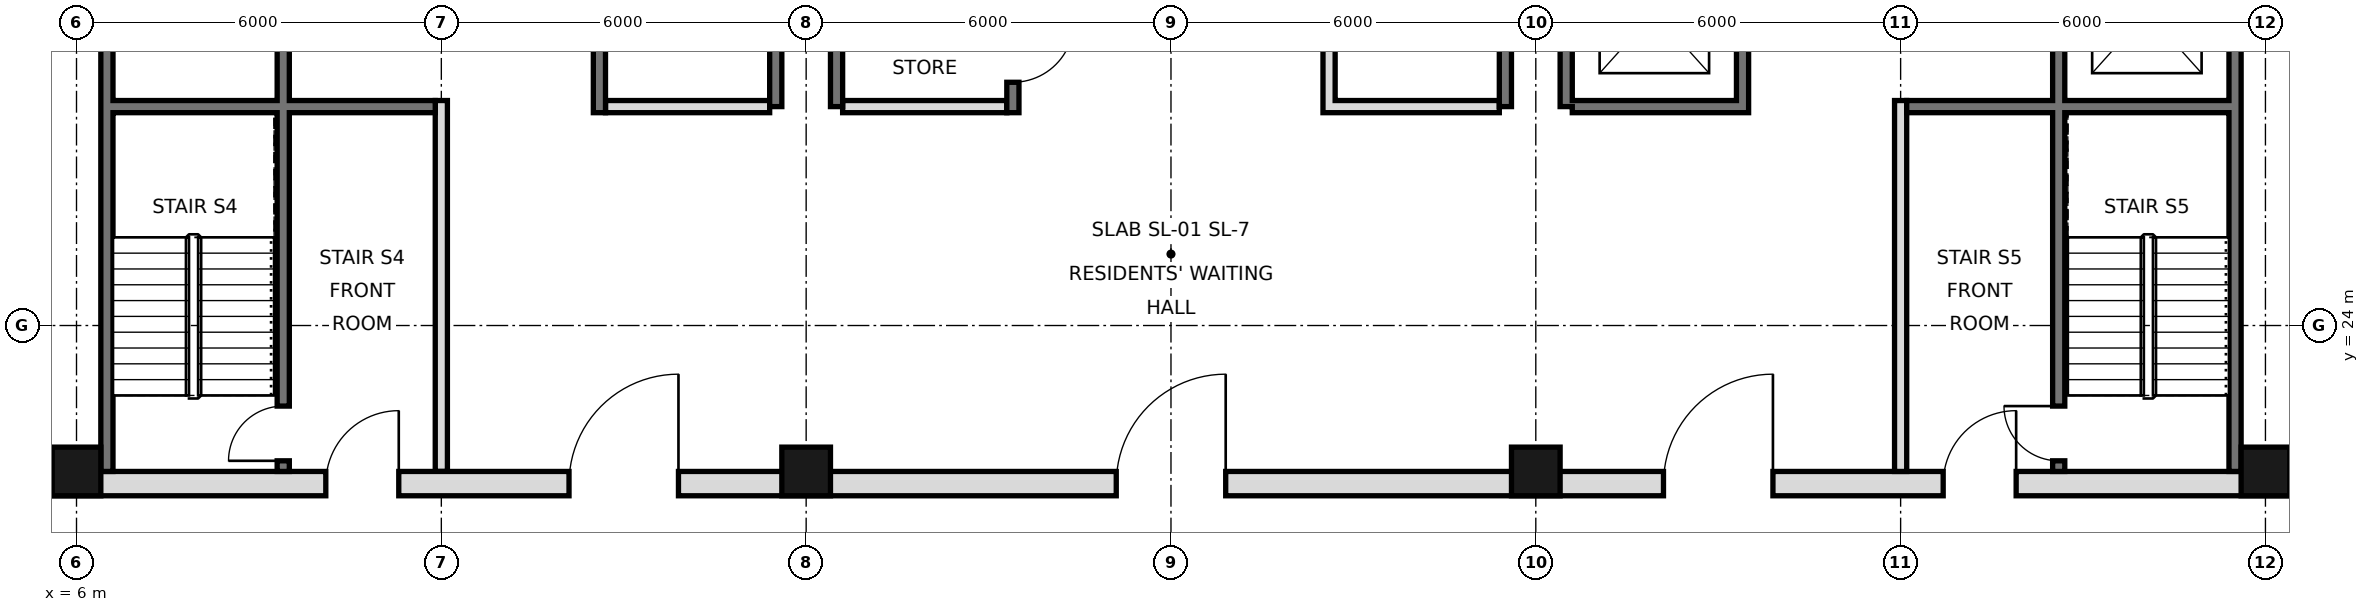
"""IFC4 building model, lengths in metres.
Left out: names, types, materials, properties, quantities, classifications, styles, units other than length and angle.
Written with IfcOpenShell. Run it as: python <this file> out.ifc"""

import sys

from ifc_helpers import new_model, si_unit, direction, frame, frame_2d, origin, origin_2d, place, context, subcontext, project, spatial, rectangle, hollow_rectangle, extrude, element, fill, save


model = new_model("IFC4")
c1 = context("Model", 3, precision=1e-05, world=origin(), true_north=direction((0.0, 1.0)))
c2 = subcontext(c1, "Body", "Model", "MODEL_VIEW")
j1 = project(units=[si_unit("LENGTHUNIT", "METRE"), si_unit("PLANEANGLEUNIT", "RADIAN")], contexts=[c1])
p1 = place(None, origin())
s1 = spatial("IfcSite", under=j1, at=p1, CompositionType="ELEMENT")
p2 = place(p1, origin())
s2 = spatial("IfcBuilding", under=s1, at=p2, CompositionType="ELEMENT")
p3 = place(p2, frame((0.0, 0.0, 301.6)))
s3 = spatial("IfcBuildingStorey", under=s2, at=p3, CompositionType="ELEMENT", Elevation=301.6)
for number, where, z_axis, x_axis in (
    (1, (6.0, 21.6, 0.0), (0.0, 0.0, 1.0), (1.0, 0.0, 0.0)),
    (2, (18.0, 21.6, 0.0), (0.0, 0.0, 1.0), (1.0, 0.0, 0.0)),
    (3, (30.0, 21.6, 0.0), (0.0, 0.0, 1.0), (1.0, 0.0, 0.0)),
    (4, (42.0, 21.6, 0.0), (0.0, 0.0, 1.0), (1.0, 0.0, 0.0)),
):
    element("IfcColumn", number, at=place(p3, frame(where, z_axis=z_axis, x_axis=x_axis)), inside=s3, PredefinedType="COLUMN", context=c2, shape_type="SweptSolid", body=[
        extrude(hollow_rectangle(XDim=0.8, YDim=0.8, WallThickness=0.025, at=origin_2d()), origin(), (0.0, 0.0, 1.0), 3.6),
    ])
for number, where, z_axis, x_axis in (
    (5, (6.5, 21.6, 0.0), (0.0, 0.0, 1.0), (0.0, 1.0, 0.0)),
    (6, (41.5, 21.6, 0.0), (0.0, 0.0, 1.0), (0.0, 1.0, 0.0)),
):
    element("IfcWall", number, at=place(p3, frame(where, z_axis=z_axis, x_axis=x_axis)), inside=s3, PredefinedType="SOLIDWALL", context=c2, shape_type="SweptSolid", body=[
        extrude(rectangle(XDim=23.5, YDim=0.2, at=frame_2d((11.75, 0.0))), origin(), (0.0, 0.0, 1.0), 3.42),
    ])
for number, where, z_axis, x_axis in (
    (7, (17.5, 27.6, 0.0), (0.0, 0.0, 1.0), (0.0, 1.0, 0.0)),
    (8, (18.5, 27.6, 0.0), (0.0, 0.0, 1.0), (0.0, 1.0, 0.0)),
    (9, (29.5, 27.6, 0.0), (0.0, 0.0, 1.0), (0.0, 1.0, 0.0)),
    (10, (30.5, 27.6, 0.0), (0.0, 0.0, 1.0), (0.0, 1.0, 0.0)),
):
    element("IfcWall", number, at=place(p3, frame(where, z_axis=z_axis, x_axis=x_axis)), inside=s3, PredefinedType="SOLIDWALL", context=c2, shape_type="SweptSolid", body=[
        extrude(rectangle(XDim=17.5, YDim=0.2, at=frame_2d((8.75, 0.0))), origin(), (0.0, 0.0, 1.0), 3.42),
    ])
p4 = place(p3, frame((5.6, 21.4, 0.0), z_axis=(0.0, 0.0, 1.0), x_axis=(1.0, 0.0, 0.0)))
e11 = element("IfcWall", 11, at=p4, inside=s3, PredefinedType="SOLIDWALL", context=c2, shape_type="SweptSolid", body=[
    extrude(rectangle(XDim=36.8, YDim=0.4, at=frame_2d((18.4, 0.0))), origin(), (0.0, 0.0, 1.0), 3.42),
])
p5 = place(p4, frame((8.5, 0.0, 0.0)))
e12 = element("IfcOpeningElement", 12, at=p5, cuts=e11, PredefinedType="OPENING", context=c2, shape_type="SweptSolid", body=[
    extrude(rectangle(XDim=1.8, YDim=2.1, at=frame_2d((0.9, 1.05))), frame((0.0, 0.21, 0.0), z_axis=(0.0, -1.0, 0.0), x_axis=(1.0, 0.0, 0.0)), (0.0, 0.0, 1.0), 0.42),
])
p6 = place(p4, frame((17.5, 0.0, 0.0)))
e13 = element("IfcOpeningElement", 13, at=p6, cuts=e11, PredefinedType="OPENING", context=c2, shape_type="SweptSolid", body=[
    extrude(rectangle(XDim=1.8, YDim=2.1, at=frame_2d((0.9, 1.05))), frame((0.0, 0.21, 0.0), z_axis=(0.0, -1.0, 0.0), x_axis=(1.0, 0.0, 0.0)), (0.0, 0.0, 1.0), 0.42),
])
p7 = place(p4, frame((26.5, 0.0, 0.0)))
e14 = element("IfcOpeningElement", 14, at=p7, cuts=e11, PredefinedType="OPENING", context=c2, shape_type="SweptSolid", body=[
    extrude(rectangle(XDim=1.8, YDim=2.1, at=frame_2d((0.9, 1.05))), frame((0.0, 0.21, 0.0), z_axis=(0.0, -1.0, 0.0), x_axis=(1.0, 0.0, 0.0)), (0.0, 0.0, 1.0), 0.42),
])
p8 = place(p4, frame((4.5, 0.0, 0.0)))
e15 = element("IfcOpeningElement", 15, at=p8, cuts=e11, PredefinedType="OPENING", context=c2, shape_type="SweptSolid", body=[
    extrude(rectangle(XDim=1.2, YDim=2.1, at=frame_2d((0.6, 1.05))), frame((0.0, 0.21, 0.0), z_axis=(0.0, -1.0, 0.0), x_axis=(1.0, 0.0, 0.0)), (0.0, 0.0, 1.0), 0.42),
])
p9 = place(p4, frame((31.1, 0.0, 0.0)))
e16 = element("IfcOpeningElement", 16, at=p9, cuts=e11, PredefinedType="OPENING", context=c2, shape_type="SweptSolid", body=[
    extrude(rectangle(XDim=1.2, YDim=2.1, at=frame_2d((0.6, 1.05))), frame((0.0, 0.21, 0.0), z_axis=(0.0, -1.0, 0.0), x_axis=(1.0, 0.0, 0.0)), (0.0, 0.0, 1.0), 0.42),
])
p10 = place(p3, frame((12.0, 21.6, 0.0), z_axis=(0.0, 0.0, 1.0), x_axis=(0.0, 1.0, 0.0)))
e17 = element("IfcWall", 17, at=p10, inside=s3, PredefinedType="PARTITIONING", context=c2, shape_type="SweptSolid", body=[
    extrude(rectangle(XDim=6.1, YDim=0.2, at=frame_2d((3.05, 0.0))), origin(), (0.0, 0.0, 1.0), 3.42),
])
p11 = place(p3, frame((14.6, 27.5, 0.0), z_axis=(0.0, 0.0, 1.0), x_axis=(0.0, 1.0, 0.0)))
e18 = element("IfcWall", 18, at=p11, inside=s3, PredefinedType="SOLIDWALL", context=c2, shape_type="SweptSolid", body=[
    extrude(rectangle(XDim=17.5, YDim=0.2, at=frame_2d((8.75, 0.0))), origin(), (0.0, 0.0, 1.0), 3.42),
])
p12 = place(p11, frame((15.4, 0.0, 0.0)))
e19 = element("IfcOpeningElement", 19, at=p12, cuts=e18, PredefinedType="OPENING", context=c2, shape_type="SweptSolid", body=[
    extrude(rectangle(XDim=1.1, YDim=2.1, at=frame_2d((0.55, 1.05))), frame((0.0, 0.11, 0.0), z_axis=(0.0, -1.0, 0.0), x_axis=(1.0, 0.0, 0.0)), (0.0, 0.0, 1.0), 0.22),
])
p13 = place(p11, frame((2.7, 0.0, 0.0)))
e20 = element("IfcOpeningElement", 20, at=p13, cuts=e18, PredefinedType="OPENING", context=c2, shape_type="SweptSolid", body=[
    extrude(rectangle(XDim=1.0, YDim=2.1, at=frame_2d((0.5, 1.05))), frame((0.0, 0.11, 0.0), z_axis=(0.0, -1.0, 0.0), x_axis=(1.0, 0.0, 0.0)), (0.0, 0.0, 1.0), 0.22),
])
p14 = place(p11, frame((9.9, 0.0, 0.0)))
e21 = element("IfcOpeningElement", 21, at=p14, cuts=e18, PredefinedType="OPENING", context=c2, shape_type="SweptSolid", body=[
    extrude(rectangle(XDim=0.9, YDim=2.1, at=frame_2d((0.45, 1.05))), frame((0.0, 0.11, 0.0), z_axis=(0.0, -1.0, 0.0), x_axis=(1.0, 0.0, 0.0)), (0.0, 0.0, 1.0), 0.22),
])
p15 = place(p3, frame((21.4, 27.5, 0.0), z_axis=(0.0, 0.0, 1.0), x_axis=(0.0, 1.0, 0.0)))
e22 = element("IfcWall", 22, at=p15, inside=s3, PredefinedType="SOLIDWALL", context=c2, shape_type="SweptSolid", body=[
    extrude(rectangle(XDim=17.5, YDim=0.2, at=frame_2d((8.75, 0.0))), origin(), (0.0, 0.0, 1.0), 3.42),
])
p16 = place(p15, frame((0.5, 0.0, 0.0)))
e23 = element("IfcOpeningElement", 23, at=p16, cuts=e22, PredefinedType="OPENING", context=c2, shape_type="SweptSolid", body=[
    extrude(rectangle(XDim=1.0, YDim=2.1, at=frame_2d((0.5, 1.05))), frame((0.0, 0.11, 0.0), z_axis=(0.0, -1.0, 0.0), x_axis=(1.0, 0.0, 0.0)), (0.0, 0.0, 1.0), 0.22),
])
p17 = place(p15, frame((3.6, 0.0, 0.0)))
e24 = element("IfcOpeningElement", 24, at=p17, cuts=e22, PredefinedType="OPENING", context=c2, shape_type="SweptSolid", body=[
    extrude(rectangle(XDim=1.0, YDim=2.1, at=frame_2d((0.5, 1.05))), frame((0.0, 0.11, 0.0), z_axis=(0.0, -1.0, 0.0), x_axis=(1.0, 0.0, 0.0)), (0.0, 0.0, 1.0), 0.22),
])
p18 = place(p15, frame((16.2, 0.0, 0.0)))
e25 = element("IfcOpeningElement", 25, at=p18, cuts=e22, PredefinedType="OPENING", context=c2, shape_type="SweptSolid", body=[
    extrude(rectangle(XDim=1.0, YDim=2.1, at=frame_2d((0.5, 1.05))), frame((0.0, 0.11, 0.0), z_axis=(0.0, -1.0, 0.0), x_axis=(1.0, 0.0, 0.0)), (0.0, 0.0, 1.0), 0.22),
])
p19 = place(p15, frame((7.4, 0.0, 0.0)))
e26 = element("IfcOpeningElement", 26, at=p19, cuts=e22, PredefinedType="OPENING", context=c2, shape_type="SweptSolid", body=[
    extrude(rectangle(XDim=0.9, YDim=2.1, at=frame_2d((0.45, 1.05))), frame((0.0, 0.11, 0.0), z_axis=(0.0, -1.0, 0.0), x_axis=(1.0, 0.0, 0.0)), (0.0, 0.0, 1.0), 0.22),
])
p20 = place(p3, frame((26.6, 27.5, 0.0), z_axis=(0.0, 0.0, 1.0), x_axis=(0.0, 1.0, 0.0)))
e27 = element("IfcWall", 27, at=p20, inside=s3, PredefinedType="SOLIDWALL", context=c2, shape_type="SweptSolid", body=[
    extrude(rectangle(XDim=17.5, YDim=0.2, at=frame_2d((8.75, 0.0))), origin(), (0.0, 0.0, 1.0), 3.42),
])
p21 = place(p20, frame((4.3, 0.0, 0.0)))
e28 = element("IfcOpeningElement", 28, at=p21, cuts=e27, PredefinedType="OPENING", context=c2, shape_type="SweptSolid", body=[
    extrude(rectangle(XDim=0.9, YDim=2.1, at=frame_2d((0.45, 1.05))), frame((0.0, 0.11, 0.0), z_axis=(0.0, -1.0, 0.0), x_axis=(1.0, 0.0, 0.0)), (0.0, 0.0, 1.0), 0.22),
])
p22 = place(p20, frame((10.35, 0.0, 0.0)))
e29 = element("IfcOpeningElement", 29, at=p22, cuts=e27, PredefinedType="OPENING", context=c2, shape_type="SweptSolid", body=[
    extrude(rectangle(XDim=1.0, YDim=2.1, at=frame_2d((0.5, 1.05))), frame((0.0, 0.11, 0.0), z_axis=(0.0, -1.0, 0.0), x_axis=(1.0, 0.0, 0.0)), (0.0, 0.0, 1.0), 0.22),
])
p23 = place(p20, frame((14.575, 0.0, 0.0)))
e30 = element("IfcOpeningElement", 30, at=p23, cuts=e27, PredefinedType="OPENING", context=c2, shape_type="SweptSolid", body=[
    extrude(rectangle(XDim=1.0, YDim=2.1, at=frame_2d((0.5, 1.05))), frame((0.0, 0.11, 0.0), z_axis=(0.0, -1.0, 0.0), x_axis=(1.0, 0.0, 0.0)), (0.0, 0.0, 1.0), 0.22),
])
p24 = place(p3, frame((33.4, 27.5, 0.0), z_axis=(0.0, 0.0, 1.0), x_axis=(0.0, 1.0, 0.0)))
e31 = element("IfcWall", 31, at=p24, inside=s3, PredefinedType="SOLIDWALL", context=c2, shape_type="SweptSolid", body=[
    extrude(rectangle(XDim=17.5, YDim=0.2, at=frame_2d((8.75, 0.0))), origin(), (0.0, 0.0, 1.0), 3.42),
])
p25 = place(p24, frame((1.1, 0.0, 0.0)))
e32 = element("IfcOpeningElement", 32, at=p25, cuts=e31, PredefinedType="OPENING", context=c2, shape_type="SweptSolid", body=[
    extrude(rectangle(XDim=1.1, YDim=2.1, at=frame_2d((0.55, 1.05))), frame((0.0, 0.11, 0.0), z_axis=(0.0, -1.0, 0.0), x_axis=(1.0, 0.0, 0.0)), (0.0, 0.0, 1.0), 0.22),
])
p26 = place(p24, frame((4.2, 0.0, 0.0)))
e33 = element("IfcOpeningElement", 33, at=p26, cuts=e31, PredefinedType="OPENING", context=c2, shape_type="SweptSolid", body=[
    extrude(rectangle(XDim=1.1, YDim=2.1, at=frame_2d((0.55, 1.05))), frame((0.0, 0.11, 0.0), z_axis=(0.0, -1.0, 0.0), x_axis=(1.0, 0.0, 0.0)), (0.0, 0.0, 1.0), 0.22),
])
p27 = place(p24, frame((15.4, 0.0, 0.0)))
e34 = element("IfcOpeningElement", 34, at=p27, cuts=e31, PredefinedType="OPENING", context=c2, shape_type="SweptSolid", body=[
    extrude(rectangle(XDim=1.1, YDim=2.1, at=frame_2d((0.55, 1.05))), frame((0.0, 0.11, 0.0), z_axis=(0.0, -1.0, 0.0), x_axis=(1.0, 0.0, 0.0)), (0.0, 0.0, 1.0), 0.22),
])
p28 = place(p24, frame((9.9, 0.0, 0.0)))
e35 = element("IfcOpeningElement", 35, at=p28, cuts=e31, PredefinedType="OPENING", context=c2, shape_type="SweptSolid", body=[
    extrude(rectangle(XDim=0.9, YDim=2.1, at=frame_2d((0.45, 1.05))), frame((0.0, 0.11, 0.0), z_axis=(0.0, -1.0, 0.0), x_axis=(1.0, 0.0, 0.0)), (0.0, 0.0, 1.0), 0.22),
])
p29 = place(p3, frame((36.0, 21.6, 0.0), z_axis=(0.0, 0.0, 1.0), x_axis=(0.0, 1.0, 0.0)))
e36 = element("IfcWall", 36, at=p29, inside=s3, PredefinedType="PARTITIONING", context=c2, shape_type="SweptSolid", body=[
    extrude(rectangle(XDim=6.1, YDim=0.2, at=frame_2d((3.05, 0.0))), origin(), (0.0, 0.0, 1.0), 3.42),
])
p30 = place(p3, frame((38.6, 21.6, 0.0), z_axis=(0.0, 0.0, 1.0), x_axis=(0.0, 1.0, 0.0)))
e37 = element("IfcWall", 37, at=p30, inside=s3, PredefinedType="SOLIDWALL", context=c2, shape_type="SweptSolid", body=[
    extrude(rectangle(XDim=23.4, YDim=0.2, at=frame_2d((11.7, 0.0))), origin(), (0.0, 0.0, 1.0), 3.42),
])
p31 = place(p30, frame((7.0, 0.0, 0.0)))
e38 = element("IfcOpeningElement", 38, at=p31, cuts=e37, PredefinedType="OPENING", context=c2, shape_type="SweptSolid", body=[
    extrude(rectangle(XDim=1.1, YDim=2.1, at=frame_2d((0.55, 1.05))), frame((0.0, 0.11, 0.0), z_axis=(0.0, -1.0, 0.0), x_axis=(1.0, 0.0, 0.0)), (0.0, 0.0, 1.0), 0.22),
])
p32 = place(p30, frame((10.1, 0.0, 0.0)))
e39 = element("IfcOpeningElement", 39, at=p32, cuts=e37, PredefinedType="OPENING", context=c2, shape_type="SweptSolid", body=[
    extrude(rectangle(XDim=1.1, YDim=2.1, at=frame_2d((0.55, 1.05))), frame((0.0, 0.11, 0.0), z_axis=(0.0, -1.0, 0.0), x_axis=(1.0, 0.0, 0.0)), (0.0, 0.0, 1.0), 0.22),
])
p33 = place(p30, frame((13.2, 0.0, 0.0)))
e40 = element("IfcOpeningElement", 40, at=p33, cuts=e37, PredefinedType="OPENING", context=c2, shape_type="SweptSolid", body=[
    extrude(rectangle(XDim=1.1, YDim=2.1, at=frame_2d((0.55, 1.05))), frame((0.0, 0.11, 0.0), z_axis=(0.0, -1.0, 0.0), x_axis=(1.0, 0.0, 0.0)), (0.0, 0.0, 1.0), 0.22),
])
p34 = place(p30, frame((22.1, 0.0, 0.0)))
e41 = element("IfcOpeningElement", 41, at=p34, cuts=e37, PredefinedType="OPENING", context=c2, shape_type="SweptSolid", body=[
    extrude(rectangle(XDim=1.0, YDim=2.1, at=frame_2d((0.5, 1.05))), frame((0.0, 0.11, 0.0), z_axis=(0.0, -1.0, 0.0), x_axis=(1.0, 0.0, 0.0)), (0.0, 0.0, 1.0), 0.22),
])
p35 = place(p30, frame((0.175, 0.0, 0.0)))
e42 = element("IfcOpeningElement", 42, at=p35, cuts=e37, PredefinedType="OPENING", context=c2, shape_type="SweptSolid", body=[
    extrude(rectangle(XDim=0.9, YDim=2.1, at=frame_2d((0.45, 1.05))), frame((0.0, 0.11, 0.0), z_axis=(0.0, -1.0, 0.0), x_axis=(1.0, 0.0, 0.0)), (0.0, 0.0, 1.0), 0.22),
])
p36 = place(p3, frame((9.4, 21.6, 0.0), z_axis=(0.0, 0.0, 1.0), x_axis=(0.0, 1.0, 0.0)))
e43 = element("IfcWall", 43, at=p36, inside=s3, PredefinedType="SOLIDWALL", context=c2, shape_type="SweptSolid", body=[
    extrude(rectangle(XDim=23.4, YDim=0.2, at=frame_2d((11.7, 0.0))), origin(), (0.0, 0.0, 1.0), 3.42),
])
p37 = place(p36, frame((7.7, 0.0, 0.0)))
e44 = element("IfcOpeningElement", 44, at=p37, cuts=e43, PredefinedType="OPENING", context=c2, shape_type="SweptSolid", body=[
    extrude(rectangle(XDim=1.0, YDim=2.1, at=frame_2d((0.5, 1.05))), frame((0.0, 0.11, 0.0), z_axis=(0.0, -1.0, 0.0), x_axis=(1.0, 0.0, 0.0)), (0.0, 0.0, 1.0), 0.22),
])
p38 = place(p36, frame((12.35, 0.0, 0.0)))
e45 = element("IfcOpeningElement", 45, at=p38, cuts=e43, PredefinedType="OPENING", context=c2, shape_type="SweptSolid", body=[
    extrude(rectangle(XDim=1.0, YDim=2.1, at=frame_2d((0.5, 1.05))), frame((0.0, 0.11, 0.0), z_axis=(0.0, -1.0, 0.0), x_axis=(1.0, 0.0, 0.0)), (0.0, 0.0, 1.0), 0.22),
])
p39 = place(p36, frame((22.1, 0.0, 0.0)))
e46 = element("IfcOpeningElement", 46, at=p39, cuts=e43, PredefinedType="OPENING", context=c2, shape_type="SweptSolid", body=[
    extrude(rectangle(XDim=1.0, YDim=2.1, at=frame_2d((0.5, 1.05))), frame((0.0, 0.11, 0.0), z_axis=(0.0, -1.0, 0.0), x_axis=(1.0, 0.0, 0.0)), (0.0, 0.0, 1.0), 0.22),
])
p40 = place(p36, frame((0.175, 0.0, 0.0)))
e47 = element("IfcOpeningElement", 47, at=p40, cuts=e43, PredefinedType="OPENING", context=c2, shape_type="SweptSolid", body=[
    extrude(rectangle(XDim=0.9, YDim=2.1, at=frame_2d((0.45, 1.05))), frame((0.0, 0.11, 0.0), z_axis=(0.0, -1.0, 0.0), x_axis=(1.0, 0.0, 0.0)), (0.0, 0.0, 1.0), 0.22),
])
for number, where, z_axis, x_axis in (
    (48, (14.7, 27.6, 0.0), (0.0, 0.0, 1.0), (1.0, 0.0, 0.0)),
    (49, (18.6, 27.6, 0.0), (0.0, 0.0, 1.0), (1.0, 0.0, 0.0)),
):
    element("IfcWall", number, at=place(p3, frame(where, z_axis=z_axis, x_axis=x_axis)), inside=s3, PredefinedType="PARTITIONING", context=c2, shape_type="SweptSolid", body=[
        extrude(rectangle(XDim=2.7, YDim=0.2, at=frame_2d((1.35, 0.0))), origin(), (0.0, 0.0, 1.0), 3.42),
    ])
for number, where, z_axis, x_axis in (
    (50, (26.7, 27.6, 0.0), (0.0, 0.0, 1.0), (1.0, 0.0, 0.0)),
    (51, (30.6, 27.6, 0.0), (0.0, 0.0, 1.0), (1.0, 0.0, 0.0)),
):
    element("IfcWall", number, at=place(p3, frame(where, z_axis=z_axis, x_axis=x_axis)), inside=s3, PredefinedType="SOLIDWALL", context=c2, shape_type="SweptSolid", body=[
        extrude(rectangle(XDim=2.7, YDim=0.2, at=frame_2d((1.35, 0.0))), origin(), (0.0, 0.0, 1.0), 3.42),
    ])
for number, where, z_axis, x_axis in (
    (52, (36.1, 27.6, 0.0), (0.0, 0.0, 1.0), (1.0, 0.0, 0.0)),
    (53, (6.6, 27.6, 0.0), (0.0, 0.0, 1.0), (1.0, 0.0, 0.0)),
):
    element("IfcWall", number, at=place(p3, frame(where, z_axis=z_axis, x_axis=x_axis)), inside=s3, PredefinedType="SOLIDWALL", context=c2, shape_type="SweptSolid", body=[
        extrude(rectangle(XDim=5.3, YDim=0.2, at=frame_2d((2.65, 0.0))), origin(), (0.0, 0.0, 1.0), 3.42),
    ])
p41 = place(p5, frame((1.8, 0.0, 0.0), z_axis=(0.0, 0.0, 1.0), x_axis=(-1.0, 0.0, 0.0)))
e54 = element("IfcDoor", 54, at=p41, inside=s3, OperationType="SINGLE_SWING_LEFT", PredefinedType="DOOR", context=c2, shape_type="SweptSolid", body=[
    extrude(rectangle(XDim=1.8, YDim=2.1, at=frame_2d((0.9, 1.05))), frame((0.0, 0.025, 0.0), z_axis=(0.0, -1.0, 0.0), x_axis=(1.0, 0.0, 0.0)), (0.0, 0.0, 1.0), 0.05),
])
fill(e12, e54)
p42 = place(p6, frame((1.8, 0.0, 0.0), z_axis=(0.0, 0.0, 1.0), x_axis=(-1.0, 0.0, 0.0)))
e55 = element("IfcDoor", 55, at=p42, inside=s3, OperationType="SINGLE_SWING_LEFT", PredefinedType="DOOR", context=c2, shape_type="SweptSolid", body=[
    extrude(rectangle(XDim=1.8, YDim=2.1, at=frame_2d((0.9, 1.05))), frame((0.0, 0.025, 0.0), z_axis=(0.0, -1.0, 0.0), x_axis=(1.0, 0.0, 0.0)), (0.0, 0.0, 1.0), 0.05),
])
fill(e13, e55)
p43 = place(p7, frame((1.8, 0.0, 0.0), z_axis=(0.0, 0.0, 1.0), x_axis=(-1.0, 0.0, 0.0)))
e56 = element("IfcDoor", 56, at=p43, inside=s3, OperationType="SINGLE_SWING_LEFT", PredefinedType="DOOR", context=c2, shape_type="SweptSolid", body=[
    extrude(rectangle(XDim=1.8, YDim=2.1, at=frame_2d((0.9, 1.05))), frame((0.0, 0.025, 0.0), z_axis=(0.0, -1.0, 0.0), x_axis=(1.0, 0.0, 0.0)), (0.0, 0.0, 1.0), 0.05),
])
fill(e14, e56)
p44 = place(p8, frame((1.2, 0.0, 0.0), z_axis=(0.0, 0.0, 1.0), x_axis=(-1.0, 0.0, 0.0)))
e57 = element("IfcDoor", 57, at=p44, inside=s3, OperationType="SINGLE_SWING_LEFT", PredefinedType="DOOR", context=c2, shape_type="SweptSolid", body=[
    extrude(rectangle(XDim=1.2, YDim=2.1, at=frame_2d((0.6, 1.05))), frame((0.0, 0.025, 0.0), z_axis=(0.0, -1.0, 0.0), x_axis=(1.0, 0.0, 0.0)), (0.0, 0.0, 1.0), 0.05),
])
fill(e15, e57)
p45 = place(p9, frame((1.2, 0.0, 0.0), z_axis=(0.0, 0.0, 1.0), x_axis=(-1.0, 0.0, 0.0)))
e58 = element("IfcDoor", 58, at=p45, inside=s3, OperationType="SINGLE_SWING_LEFT", PredefinedType="DOOR", context=c2, shape_type="SweptSolid", body=[
    extrude(rectangle(XDim=1.2, YDim=2.1, at=frame_2d((0.6, 1.05))), frame((0.0, 0.025, 0.0), z_axis=(0.0, -1.0, 0.0), x_axis=(1.0, 0.0, 0.0)), (0.0, 0.0, 1.0), 0.05),
])
fill(e16, e58)
p46 = place(p16, origin())
e59 = element("IfcDoor", 59, at=p46, inside=s3, OperationType="SINGLE_SWING_RIGHT", PredefinedType="DOOR", context=c2, shape_type="SweptSolid", body=[
    extrude(rectangle(XDim=1.0, YDim=2.1, at=frame_2d((0.5, 1.05))), frame((0.0, 0.025, 0.0), z_axis=(0.0, -1.0, 0.0), x_axis=(1.0, 0.0, 0.0)), (0.0, 0.0, 1.0), 0.05),
])
fill(e23, e59)
p47 = place(p40, origin())
e60 = element("IfcDoor", 60, at=p47, inside=s3, OperationType="SINGLE_SWING_LEFT", PredefinedType="DOOR", context=c2, shape_type="SweptSolid", body=[
    extrude(rectangle(XDim=0.9, YDim=2.1, at=frame_2d((0.45, 1.05))), frame((0.0, 0.025, 0.0), z_axis=(0.0, -1.0, 0.0), x_axis=(1.0, 0.0, 0.0)), (0.0, 0.0, 1.0), 0.05),
])
fill(e47, e60)
p48 = place(p35, frame((0.9, 0.0, 0.0), z_axis=(0.0, 0.0, 1.0), x_axis=(-1.0, 0.0, 0.0)))
e61 = element("IfcDoor", 61, at=p48, inside=s3, OperationType="SINGLE_SWING_LEFT", PredefinedType="DOOR", context=c2, shape_type="SweptSolid", body=[
    extrude(rectangle(XDim=0.9, YDim=2.1, at=frame_2d((0.45, 1.05))), frame((0.0, 0.025, 0.0), z_axis=(0.0, -1.0, 0.0), x_axis=(1.0, 0.0, 0.0)), (0.0, 0.0, 1.0), 0.05),
])
fill(e42, e61)
save(model, sys.argv[1])
